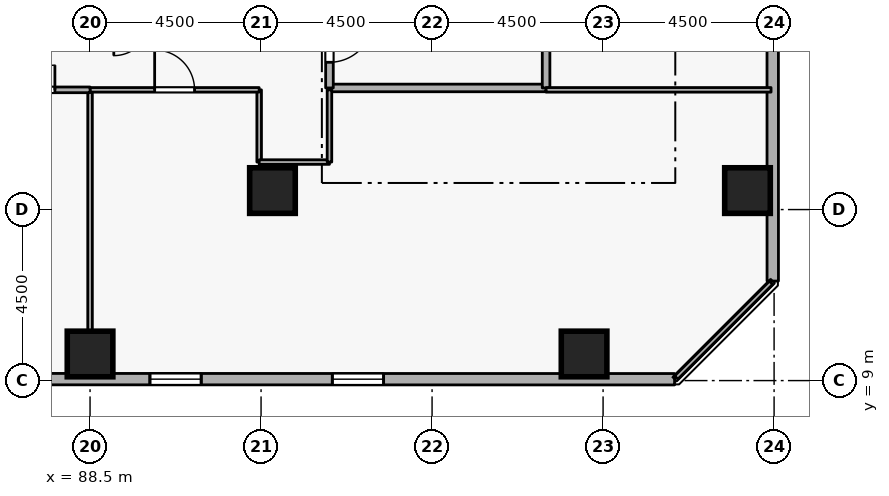
"""IFC4 building model, lengths in metres.
Left out: names, types, materials, properties, quantities, classifications, styles, units other than length and angle.
Written with IfcOpenShell. Run it as: python <this file> out.ifc"""

import sys

from ifc_helpers import new_model, si_unit, direction, frame, frame_2d, origin, origin_2d, place, context, subcontext, project, spatial, rectangle, extrude, element, fill, save


model = new_model("IFC4")
c1 = context("Model", 3, precision=1e-05, world=origin(), true_north=direction((0.0, 1.0)))
c2 = subcontext(c1, "Body", "Model", "MODEL_VIEW")
j1 = project(units=[si_unit("LENGTHUNIT", "METRE"), si_unit("PLANEANGLEUNIT", "RADIAN")], contexts=[c1])
p1 = place(None, origin())
s1 = spatial("IfcSite", under=j1, at=p1, CompositionType="ELEMENT")
p2 = place(p1, origin())
s2 = spatial("IfcBuilding", under=s1, at=p2, CompositionType="ELEMENT")
p3 = place(p2, frame((0.0, 0.0, 94.5)))
s3 = spatial("IfcBuildingStorey", under=s2, at=p3, CompositionType="ELEMENT", Elevation=94.5)
for number, where, z_axis, x_axis in (
    (1, (105.8, 14.0, 0.0), (0.0, 0.0, 1.0), (1.0, 0.0, 0.0)),
    (2, (101.5, 9.7, 0.0), (0.0, 0.0, 1.0), (1.0, 0.0, 0.0)),
    (3, (88.5, 9.7, 0.0), (0.0, 0.0, 1.0), (1.0, 0.0, 0.0)),
    (4, (93.3, 14.0, 0.0), (0.0, 0.0, 1.0), (1.0, 0.0, 0.0)),
):
    element("IfcColumn", number, at=place(p3, frame(where, z_axis=z_axis, x_axis=x_axis)), inside=s3, PredefinedType="COLUMN", context=c2, shape_type="SweptSolid", body=[
        extrude(rectangle(XDim=1.2, YDim=1.2, at=origin_2d()), origin(), (0.0, 0.0, 1.0), 3.6),
    ])
p4 = place(p3, frame((69.075, 9.042, 0.0), z_axis=(0.0, 0.0, 1.0), x_axis=(0.999999983371, -0.000182370391, 0.0)))
e5 = element("IfcWall", 5, at=p4, inside=s3, PredefinedType="STANDARD", context=c2, shape_type="SweptSolid", body=[
    extrude(rectangle(XDim=34.806, YDim=0.3, at=frame_2d((17.403, 0.0))), origin(), (0.0, 0.0, 1.0), 2.22),
])
p5 = place(p4, frame((1.8, 0.0, 0.72)))
e6 = element("IfcOpeningElement", 6, at=p5, cuts=e5, PredefinedType="OPENING", context=c2, shape_type="SweptSolid", body=[
    extrude(rectangle(XDim=1.35, YDim=1.05, at=frame_2d((0.675, 0.525))), frame((0.0, 0.16, 0.0), z_axis=(0.0, -1.0, 0.0), x_axis=(1.0, 0.0, 0.0)), (0.0, 0.0, 1.0), 0.32),
])
p6 = place(p4, frame((11.4, 0.0, 0.72)))
e7 = element("IfcOpeningElement", 7, at=p6, cuts=e5, PredefinedType="OPENING", context=c2, shape_type="SweptSolid", body=[
    extrude(rectangle(XDim=1.35, YDim=1.05, at=frame_2d((0.675, 0.525))), frame((0.0, 0.16, 0.0), z_axis=(0.0, -1.0, 0.0), x_axis=(1.0, 0.0, 0.0)), (0.0, 0.0, 1.0), 0.32),
])
p7 = place(p4, frame((21.0, 0.0, 0.72)))
e8 = element("IfcOpeningElement", 8, at=p7, cuts=e5, PredefinedType="OPENING", context=c2, shape_type="SweptSolid", body=[
    extrude(rectangle(XDim=1.35, YDim=1.05, at=frame_2d((0.675, 0.525))), frame((0.0, 0.16, 0.0), z_axis=(0.0, -1.0, 0.0), x_axis=(1.0, 0.0, 0.0)), (0.0, 0.0, 1.0), 0.32),
])
p8 = place(p4, frame((25.8, 0.0, 0.72)))
e9 = element("IfcOpeningElement", 9, at=p8, cuts=e5, PredefinedType="OPENING", context=c2, shape_type="SweptSolid", body=[
    extrude(rectangle(XDim=1.35, YDim=1.05, at=frame_2d((0.675, 0.525))), frame((0.0, 0.16, 0.0), z_axis=(0.0, -1.0, 0.0), x_axis=(1.0, 0.0, 0.0)), (0.0, 0.0, 1.0), 0.32),
])
p9 = place(p3, frame((106.465, 11.619, 0.0), z_axis=(0.0, 0.0, 1.0), x_axis=(-0.000182370391, 0.999999983371, 0.0)))
e10 = element("IfcWall", 10, at=p9, inside=s3, PredefinedType="STANDARD", context=c2, shape_type="SweptSolid", body=[
    extrude(rectangle(XDim=34.806, YDim=0.3, at=frame_2d((17.403, 0.0))), origin(), (0.0, 0.0, 1.0), 2.22),
])
p10 = place(p9, frame((6.6, 0.0, 0.72)))
e11 = element("IfcOpeningElement", 11, at=p10, cuts=e10, PredefinedType="OPENING", context=c2, shape_type="SweptSolid", body=[
    extrude(rectangle(XDim=1.35, YDim=1.05, at=frame_2d((0.675, 0.525))), frame((0.0, 0.16, 0.0), z_axis=(0.0, -1.0, 0.0), x_axis=(1.0, 0.0, 0.0)), (0.0, 0.0, 1.0), 0.32),
])
p11 = place(p9, frame((11.4, 0.0, 0.72)))
e12 = element("IfcOpeningElement", 12, at=p11, cuts=e10, PredefinedType="OPENING", context=c2, shape_type="SweptSolid", body=[
    extrude(rectangle(XDim=1.35, YDim=1.05, at=frame_2d((0.675, 0.525))), frame((0.0, 0.16, 0.0), z_axis=(0.0, -1.0, 0.0), x_axis=(1.0, 0.0, 0.0)), (0.0, 0.0, 1.0), 0.32),
])
p12 = place(p9, frame((21.0, 0.0, 0.72)))
e13 = element("IfcOpeningElement", 13, at=p12, cuts=e10, PredefinedType="OPENING", context=c2, shape_type="SweptSolid", body=[
    extrude(rectangle(XDim=1.35, YDim=1.05, at=frame_2d((0.675, 0.525))), frame((0.0, 0.16, 0.0), z_axis=(0.0, -1.0, 0.0), x_axis=(1.0, 0.0, 0.0)), (0.0, 0.0, 1.0), 0.32),
])
p13 = place(p9, frame((25.8, 0.0, 0.72)))
e14 = element("IfcOpeningElement", 14, at=p13, cuts=e10, PredefinedType="OPENING", context=c2, shape_type="SweptSolid", body=[
    extrude(rectangle(XDim=1.35, YDim=1.05, at=frame_2d((0.675, 0.525))), frame((0.0, 0.16, 0.0), z_axis=(0.0, -1.0, 0.0), x_axis=(1.0, 0.0, 0.0)), (0.0, 0.0, 1.0), 0.32),
])
p14 = place(p9, frame((30.6, 0.0, 0.72)))
e15 = element("IfcOpeningElement", 15, at=p14, cuts=e10, PredefinedType="OPENING", context=c2, shape_type="SweptSolid", body=[
    extrude(rectangle(XDim=1.35, YDim=1.05, at=frame_2d((0.675, 0.525))), frame((0.0, 0.16, 0.0), z_axis=(0.0, -1.0, 0.0), x_axis=(1.0, 0.0, 0.0)), (0.0, 0.0, 1.0), 0.32),
])
p15 = place(p3, frame((94.8, 16.7, 0.0), z_axis=(0.0, 0.0, 1.0), x_axis=(1.0, 0.0, 0.0)))
e16 = element("IfcWall", 16, at=p15, inside=s3, PredefinedType="STANDARD", context=c2, shape_type="SweptSolid", body=[
    extrude(rectangle(XDim=5.7, YDim=0.2, at=frame_2d((2.85, 0.0))), origin(), (0.0, 0.0, 1.0), 3.3),
])
p16 = place(p3, frame((100.5, 16.7, 0.0), z_axis=(0.0, 0.0, 1.0), x_axis=(0.0, 1.0, 0.0)))
e17 = element("IfcWall", 17, at=p16, inside=s3, PredefinedType="STANDARD", context=c2, shape_type="SweptSolid", body=[
    extrude(rectangle(XDim=2.5, YDim=0.2, at=frame_2d((1.25, 0.0))), origin(), (0.0, 0.0, 1.0), 3.3),
])
p17 = place(p3, frame((94.8, 19.2, 0.0), z_axis=(0.0, 0.0, 1.0), x_axis=(0.0, -1.0, 0.0)))
e18 = element("IfcWall", 18, at=p17, inside=s3, PredefinedType="STANDARD", context=c2, shape_type="SweptSolid", body=[
    extrude(rectangle(XDim=2.5, YDim=0.2, at=frame_2d((1.25, 0.0))), origin(), (0.0, 0.0, 1.0), 3.3),
])
p18 = place(p17, frame((0.675, 0.0, 0.0)))
e19 = element("IfcOpeningElement", 19, at=p18, cuts=e18, PredefinedType="OPENING", context=c2, shape_type="SweptSolid", body=[
    extrude(rectangle(XDim=1.15, YDim=2.1, at=frame_2d((0.575, 1.05))), frame((0.0, 0.11, 0.0), z_axis=(0.0, -1.0, 0.0), x_axis=(1.0, 0.0, 0.0)), (0.0, 0.0, 1.0), 0.22),
])
p19 = place(p3, frame((92.95, 16.65, 0.0), z_axis=(0.0, 0.0, 1.0), x_axis=(0.0, -1.0, 0.0)))
e20 = element("IfcWall", 20, at=p19, inside=s3, PredefinedType="PARTITIONING", context=c2, shape_type="SweptSolid", body=[
    extrude(rectangle(XDim=1.9, YDim=0.12, at=frame_2d((0.95, 0.0))), origin(), (0.0, 0.0, 1.0), 3.3),
])
p20 = place(p3, frame((92.95, 14.75, 0.0), z_axis=(0.0, 0.0, 1.0), x_axis=(1.0, 0.0, 0.0)))
e21 = element("IfcWall", 21, at=p20, inside=s3, PredefinedType="PARTITIONING", context=c2, shape_type="SweptSolid", body=[
    extrude(rectangle(XDim=1.85, YDim=0.12, at=frame_2d((0.925, 0.0))), origin(), (0.0, 0.0, 1.0), 3.3),
])
p21 = place(p3, frame((94.8, 14.75, 0.0), z_axis=(0.0, 0.0, 1.0), x_axis=(0.0, 1.0, 0.0)))
e22 = element("IfcWall", 22, at=p21, inside=s3, PredefinedType="PARTITIONING", context=c2, shape_type="SweptSolid", body=[
    extrude(rectangle(XDim=1.9, YDim=0.12, at=frame_2d((0.95, 0.0))), origin(), (0.0, 0.0, 1.0), 3.3),
])
p22 = place(p3, frame((100.5, 16.65, 0.0), z_axis=(0.0, 0.0, 1.0), x_axis=(1.0, 0.0, 0.0)))
e23 = element("IfcWall", 23, at=p22, inside=s3, PredefinedType="PARTITIONING", context=c2, shape_type="SweptSolid", body=[
    extrude(rectangle(XDim=5.92, YDim=0.12, at=frame_2d((2.96, 0.0))), origin(), (0.0, 0.0, 1.0), 3.3),
])
p23 = place(p3, frame((106.42, 11.575, 0.0), z_axis=(0.0, 0.0, 1.0), x_axis=(-0.707106781187, -0.707106781187, 0.0)))
e24 = element("IfcWall", 24, at=p23, inside=s3, PredefinedType="PARTITIONING", context=c2, shape_type="SweptSolid", body=[
    extrude(rectangle(XDim=3.528, YDim=0.12, at=frame_2d((1.764, 0.0))), origin(), (0.0, 0.0, 1.0), 3.3),
])
p24 = place(p3, frame((88.5, 9.08, 0.0), z_axis=(0.0, 0.0, 1.0), x_axis=(0.0, 1.0, 0.0)))
e25 = element("IfcWall", 25, at=p24, inside=s3, PredefinedType="PARTITIONING", context=c2, shape_type="SweptSolid", body=[
    extrude(rectangle(XDim=7.57, YDim=0.12, at=frame_2d((3.785, 0.0))), origin(), (0.0, 0.0, 1.0), 1.685),
])
p25 = place(p3, frame((88.5, 16.65, 0.0), z_axis=(0.0, 0.0, 1.0), x_axis=(1.0, 0.0, 0.0)))
e26 = element("IfcWall", 26, at=p25, inside=s3, PredefinedType="PARTITIONING", context=c2, shape_type="SweptSolid", body=[
    extrude(rectangle(XDim=4.45, YDim=0.12, at=frame_2d((2.225, 0.0))), origin(), (0.0, 0.0, 1.0), 3.3),
])
p26 = place(p25, frame((1.7, 0.0, 0.0)))
e27 = element("IfcOpeningElement", 27, at=p26, cuts=e26, PredefinedType="OPENING", context=c2, shape_type="SweptSolid", body=[
    extrude(rectangle(XDim=1.05, YDim=2.1, at=frame_2d((0.525, 1.05))), frame((0.0, 0.07, 0.0), z_axis=(0.0, -1.0, 0.0), x_axis=(1.0, 0.0, 0.0)), (0.0, 0.0, 1.0), 0.14),
])
p27 = place(p3, frame((85.35, 16.65, 0.0), z_axis=(0.0, 0.0, 1.0), x_axis=(1.0, 0.0, 0.0)))
e28 = element("IfcWall", 28, at=p27, inside=s3, PredefinedType="PARTITIONING", context=c2, shape_type="SweptSolid", body=[
    extrude(rectangle(XDim=3.15, YDim=0.15, at=frame_2d((1.575, 0.0))), origin(), (0.0, 0.0, 1.0), 3.3),
])
p28 = place(p27, frame((0.925, 0.0, 0.0)))
e29 = element("IfcOpeningElement", 29, at=p28, cuts=e28, PredefinedType="OPENING", context=c2, shape_type="SweptSolid", body=[
    extrude(rectangle(XDim=1.3, YDim=2.12, at=frame_2d((0.65, 1.06))), frame((0.0, 0.085, 0.0), z_axis=(0.0, -1.0, 0.0), x_axis=(1.0, 0.0, 0.0)), (0.0, 0.0, 1.0), 0.17),
])
p29 = place(p7, origin())
e30 = element("IfcWindow", 30, at=p29, inside=s3, PartitioningType="SINGLE_PANEL", PredefinedType="WINDOW", context=c2, shape_type="SweptSolid", body=[
    extrude(rectangle(XDim=1.35, YDim=1.05, at=frame_2d((0.675, 0.525))), frame((0.0, 0.03, 0.0), z_axis=(0.0, -1.0, 0.0), x_axis=(1.0, 0.0, 0.0)), (0.0, 0.0, 1.0), 0.06),
])
fill(e8, e30)
p30 = place(p8, origin())
e31 = element("IfcWindow", 31, at=p30, inside=s3, PartitioningType="SINGLE_PANEL", PredefinedType="WINDOW", context=c2, shape_type="SweptSolid", body=[
    extrude(rectangle(XDim=1.35, YDim=1.05, at=frame_2d((0.675, 0.525))), frame((0.0, 0.03, 0.0), z_axis=(0.0, -1.0, 0.0), x_axis=(1.0, 0.0, 0.0)), (0.0, 0.0, 1.0), 0.06),
])
fill(e9, e31)
p31 = place(p18, origin())
e32 = element("IfcDoor", 32, at=p31, inside=s3, OperationType="SINGLE_SWING_LEFT", PredefinedType="DOOR", context=c2, shape_type="SweptSolid", body=[
    extrude(rectangle(XDim=1.15, YDim=2.1, at=frame_2d((0.575, 1.05))), frame((0.0, 0.025, 0.0), z_axis=(0.0, -1.0, 0.0), x_axis=(1.0, 0.0, 0.0)), (0.0, 0.0, 1.0), 0.05),
])
fill(e19, e32)
p32 = place(p26, origin())
e33 = element("IfcDoor", 33, at=p32, inside=s3, OperationType="SINGLE_SWING_LEFT", PredefinedType="DOOR", context=c2, shape_type="SweptSolid", body=[
    extrude(rectangle(XDim=1.05, YDim=2.1, at=frame_2d((0.525, 1.05))), frame((0.0, 0.025, 0.0), z_axis=(0.0, -1.0, 0.0), x_axis=(1.0, 0.0, 0.0)), (0.0, 0.0, 1.0), 0.05),
])
fill(e27, e33)
p33 = place(p28, origin())
e34 = element("IfcDoor", 34, at=p33, inside=s3, OperationType="DOUBLE_DOOR_SINGLE_SWING", PredefinedType="DOOR", context=c2, shape_type="SweptSolid", body=[
    extrude(rectangle(XDim=1.3, YDim=2.12, at=frame_2d((0.65, 1.06))), frame((0.0, 0.025, 0.0), z_axis=(0.0, -1.0, 0.0), x_axis=(1.0, 0.0, 0.0)), (0.0, 0.0, 1.0), 0.05),
])
fill(e29, e34)
save(model, sys.argv[1])
